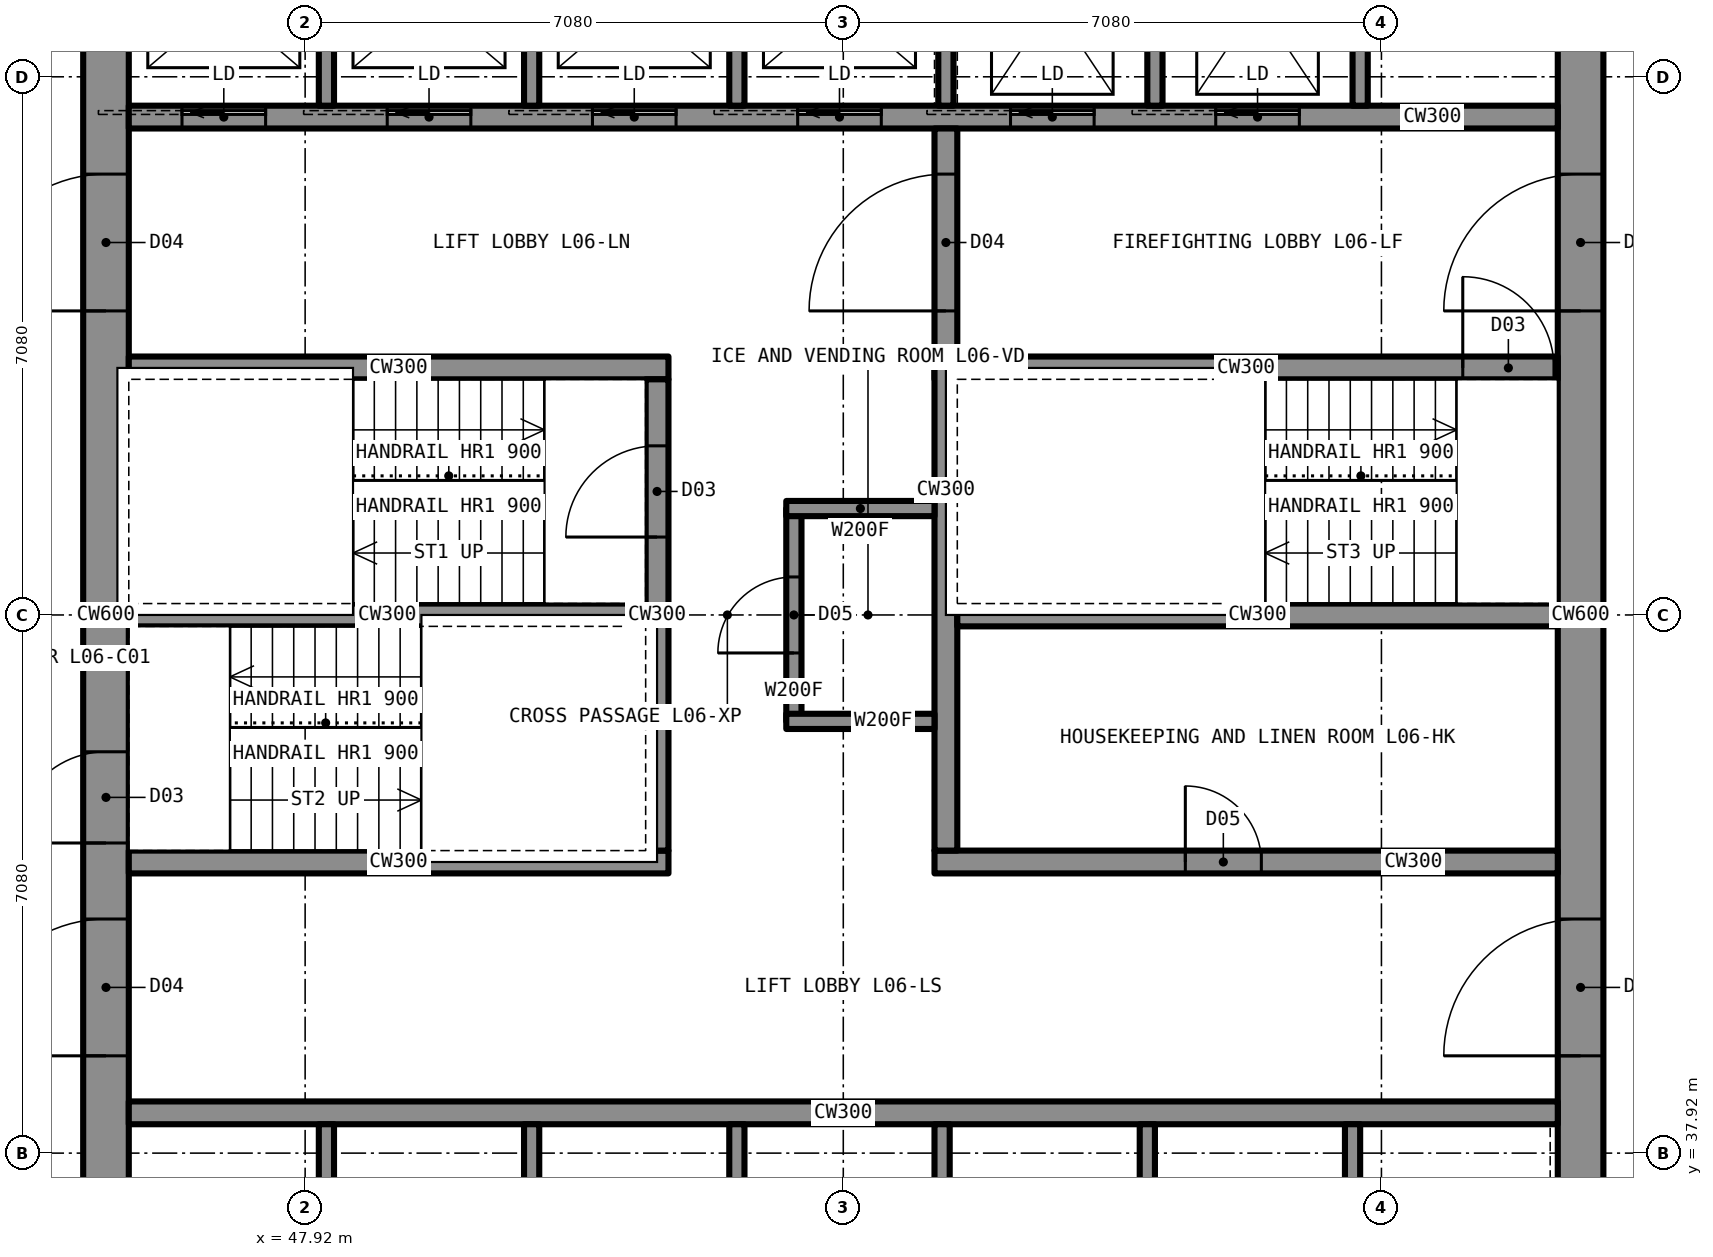
"""IFC4 building model, lengths in metres.
Left out: names, types, materials, properties, quantities, classifications, styles, units other than length and angle.
Written with IfcOpenShell. Run it as: python <this file> out.ifc"""

import sys

from ifc_helpers import new_model, si_unit, direction, frame, frame_2d, origin, place, context, subcontext, project, spatial, rectangle, extrude, element, fill, save


model = new_model("IFC4")
c1 = context("Model", 3, precision=1e-05, world=origin(), true_north=direction((0.0, 1.0)))
c2 = subcontext(c1, "Body", "Model", "MODEL_VIEW")
j1 = project(units=[si_unit("LENGTHUNIT", "METRE"), si_unit("PLANEANGLEUNIT", "RADIAN")], contexts=[c1])
p1 = place(None, origin())
s1 = spatial("IfcSite", under=j1, at=p1, CompositionType="ELEMENT")
p2 = place(p1, origin())
s2 = spatial("IfcBuilding", under=s1, at=p2, CompositionType="ELEMENT")
p3 = place(p2, frame((0.0, 0.0, 28.5)))
s3 = spatial("IfcBuildingStorey", under=s2, at=p3, CompositionType="ELEMENT", Elevation=28.5)
p4 = place(p3, frame((64.7, 35.6, 0.0), z_axis=(0.0, 0.0, 1.0), x_axis=(0.0, 1.0, 0.0)))
e1 = element("IfcWall", 1, at=p4, inside=s3, PredefinedType="SHEAR", context=c2, shape_type="SweptSolid", body=[
    extrude(rectangle(XDim=18.8, YDim=0.6, at=frame_2d((9.4, 0.0))), origin(), (0.0, 0.0, 1.0), 3.5),
])
p5 = place(p4, frame((13.4, 0.0, 0.0)))
e2 = element("IfcOpeningElement", 2, at=p5, cuts=e1, PredefinedType="OPENING", context=c2, shape_type="SweptSolid", body=[
    extrude(rectangle(XDim=1.8, YDim=2.2, at=frame_2d((0.9, 1.1))), frame((0.0, 0.31, 0.0), z_axis=(0.0, -1.0, 0.0), x_axis=(1.0, 0.0, 0.0)), (0.0, 0.0, 1.0), 0.62),
])
p6 = place(p4, frame((3.6, 0.0, 0.0)))
e3 = element("IfcOpeningElement", 3, at=p6, cuts=e1, PredefinedType="OPENING", context=c2, shape_type="SweptSolid", body=[
    extrude(rectangle(XDim=1.8, YDim=2.2, at=frame_2d((0.9, 1.1))), frame((0.0, 0.31, 0.0), z_axis=(0.0, -1.0, 0.0), x_axis=(1.0, 0.0, 0.0)), (0.0, 0.0, 1.0), 0.62),
])
p7 = place(p3, frame((45.3, 35.6, 0.0), z_axis=(0.0, 0.0, 1.0), x_axis=(0.0, 1.0, 0.0)))
e4 = element("IfcWall", 4, at=p7, inside=s3, PredefinedType="SHEAR", context=c2, shape_type="SweptSolid", body=[
    extrude(rectangle(XDim=18.8, YDim=0.6, at=frame_2d((9.4, 0.0))), origin(), (0.0, 0.0, 1.0), 3.5),
])
p8 = place(p7, frame((13.4, 0.0, 0.0)))
e5 = element("IfcOpeningElement", 5, at=p8, cuts=e4, PredefinedType="OPENING", context=c2, shape_type="SweptSolid", body=[
    extrude(rectangle(XDim=1.8, YDim=2.2, at=frame_2d((0.9, 1.1))), frame((0.0, 0.31, 0.0), z_axis=(0.0, -1.0, 0.0), x_axis=(1.0, 0.0, 0.0)), (0.0, 0.0, 1.0), 0.62),
])
p9 = place(p7, frame((3.6, 0.0, 0.0)))
e6 = element("IfcOpeningElement", 6, at=p9, cuts=e4, PredefinedType="OPENING", context=c2, shape_type="SweptSolid", body=[
    extrude(rectangle(XDim=1.8, YDim=2.2, at=frame_2d((0.9, 1.1))), frame((0.0, 0.31, 0.0), z_axis=(0.0, -1.0, 0.0), x_axis=(1.0, 0.0, 0.0)), (0.0, 0.0, 1.0), 0.62),
])
p10 = place(p7, frame((6.4, 0.0, 0.0)))
e7 = element("IfcOpeningElement", 7, at=p10, cuts=e4, PredefinedType="OPENING", context=c2, shape_type="SweptSolid", body=[
    extrude(rectangle(XDim=1.2, YDim=2.2, at=frame_2d((0.6, 1.1))), frame((0.0, 0.31, 0.0), z_axis=(0.0, -1.0, 0.0), x_axis=(1.0, 0.0, 0.0)), (0.0, 0.0, 1.0), 0.62),
])
p11 = place(p3, frame((45.6, 51.55, 0.0), z_axis=(0.0, 0.0, 1.0), x_axis=(1.0, 0.0, 0.0)))
e8 = element("IfcWall", 8, at=p11, inside=s3, PredefinedType="SHEAR", context=c2, shape_type="SweptSolid", body=[
    extrude(rectangle(XDim=18.8, YDim=0.3, at=frame_2d((9.4, 0.0))), origin(), (0.0, 0.0, 1.0), 3.5),
])
p12 = place(p11, frame((0.7, 0.0, 0.0)))
e9 = element("IfcOpeningElement", 9, at=p12, cuts=e8, PredefinedType="OPENING", context=c2, shape_type="SweptSolid", body=[
    extrude(rectangle(XDim=1.1, YDim=2.2, at=frame_2d((0.55, 1.1))), frame((0.0, 0.16, 0.0), z_axis=(0.0, -1.0, 0.0), x_axis=(1.0, 0.0, 0.0)), (0.0, 0.0, 1.0), 0.32),
])
p13 = place(p11, frame((3.4, 0.0, 0.0)))
e10 = element("IfcOpeningElement", 10, at=p13, cuts=e8, PredefinedType="OPENING", context=c2, shape_type="SweptSolid", body=[
    extrude(rectangle(XDim=1.1, YDim=2.2, at=frame_2d((0.55, 1.1))), frame((0.0, 0.16, 0.0), z_axis=(0.0, -1.0, 0.0), x_axis=(1.0, 0.0, 0.0)), (0.0, 0.0, 1.0), 0.32),
])
p14 = place(p11, frame((6.1, 0.0, 0.0)))
e11 = element("IfcOpeningElement", 11, at=p14, cuts=e8, PredefinedType="OPENING", context=c2, shape_type="SweptSolid", body=[
    extrude(rectangle(XDim=1.1, YDim=2.2, at=frame_2d((0.55, 1.1))), frame((0.0, 0.16, 0.0), z_axis=(0.0, -1.0, 0.0), x_axis=(1.0, 0.0, 0.0)), (0.0, 0.0, 1.0), 0.32),
])
p15 = place(p11, frame((8.8, 0.0, 0.0)))
e12 = element("IfcOpeningElement", 12, at=p15, cuts=e8, PredefinedType="OPENING", context=c2, shape_type="SweptSolid", body=[
    extrude(rectangle(XDim=1.1, YDim=2.2, at=frame_2d((0.55, 1.1))), frame((0.0, 0.16, 0.0), z_axis=(0.0, -1.0, 0.0), x_axis=(1.0, 0.0, 0.0)), (0.0, 0.0, 1.0), 0.32),
])
p16 = place(p11, frame((11.6, 0.0, 0.0)))
e13 = element("IfcOpeningElement", 13, at=p16, cuts=e8, PredefinedType="OPENING", context=c2, shape_type="SweptSolid", body=[
    extrude(rectangle(XDim=1.1, YDim=2.2, at=frame_2d((0.55, 1.1))), frame((0.0, 0.16, 0.0), z_axis=(0.0, -1.0, 0.0), x_axis=(1.0, 0.0, 0.0)), (0.0, 0.0, 1.0), 0.32),
])
p17 = place(p11, frame((14.3, 0.0, 0.0)))
e14 = element("IfcOpeningElement", 14, at=p17, cuts=e8, PredefinedType="OPENING", context=c2, shape_type="SweptSolid", body=[
    extrude(rectangle(XDim=1.1, YDim=2.2, at=frame_2d((0.55, 1.1))), frame((0.0, 0.16, 0.0), z_axis=(0.0, -1.0, 0.0), x_axis=(1.0, 0.0, 0.0)), (0.0, 0.0, 1.0), 0.32),
])
p18 = place(p3, frame((45.6, 38.45, 0.0), z_axis=(0.0, 0.0, 1.0), x_axis=(1.0, 0.0, 0.0)))
e15 = element("IfcWall", 15, at=p18, inside=s3, PredefinedType="SHEAR", context=c2, shape_type="SweptSolid", body=[
    extrude(rectangle(XDim=18.8, YDim=0.3, at=frame_2d((9.4, 0.0))), origin(), (0.0, 0.0, 1.0), 3.5),
])
p19 = place(p3, frame((45.6, 48.25, 0.0), z_axis=(0.0, 0.0, 1.0), x_axis=(1.0, 0.0, 0.0)))
e16 = element("IfcWall", 16, at=p19, inside=s3, PredefinedType="SHEAR", context=c2, shape_type="SweptSolid", body=[
    extrude(rectangle(XDim=7.1, YDim=0.3, at=frame_2d((3.55, 0.0))), origin(), (0.0, 0.0, 1.0), 3.5),
])
p20 = place(p3, frame((56.2, 48.25, 0.0), z_axis=(0.0, 0.0, 1.0), x_axis=(1.0, 0.0, 0.0)))
e17 = element("IfcWall", 17, at=p20, inside=s3, PredefinedType="SHEAR", context=c2, shape_type="SweptSolid", body=[
    extrude(rectangle(XDim=8.2, YDim=0.3, at=frame_2d((4.1, 0.0))), origin(), (0.0, 0.0, 1.0), 3.5),
])
p21 = place(p20, frame((6.95, 0.0, 0.0)))
e18 = element("IfcOpeningElement", 18, at=p21, cuts=e17, PredefinedType="OPENING", context=c2, shape_type="SweptSolid", body=[
    extrude(rectangle(XDim=1.2, YDim=2.2, at=frame_2d((0.6, 1.1))), frame((0.0, 0.16, 0.0), z_axis=(0.0, -1.0, 0.0), x_axis=(1.0, 0.0, 0.0)), (0.0, 0.0, 1.0), 0.32),
])
p22 = place(p3, frame((45.6, 41.75, 0.0), z_axis=(0.0, 0.0, 1.0), x_axis=(1.0, 0.0, 0.0)))
e19 = element("IfcWall", 19, at=p22, inside=s3, PredefinedType="SHEAR", context=c2, shape_type="SweptSolid", body=[
    extrude(rectangle(XDim=7.1, YDim=0.3, at=frame_2d((3.55, 0.0))), origin(), (0.0, 0.0, 1.0), 3.5),
])
p23 = place(p3, frame((56.2, 41.75, 0.0), z_axis=(0.0, 0.0, 1.0), x_axis=(1.0, 0.0, 0.0)))
e20 = element("IfcWall", 20, at=p23, inside=s3, PredefinedType="SHEAR", context=c2, shape_type="SweptSolid", body=[
    extrude(rectangle(XDim=8.2, YDim=0.3, at=frame_2d((4.1, 0.0))), origin(), (0.0, 0.0, 1.0), 3.5),
])
p24 = place(p23, frame((3.3, 0.0, 0.0)))
e21 = element("IfcOpeningElement", 21, at=p24, cuts=e20, PredefinedType="OPENING", context=c2, shape_type="SweptSolid", body=[
    extrude(rectangle(XDim=1.0, YDim=2.1, at=frame_2d((0.5, 1.05))), frame((0.0, 0.16, 0.0), z_axis=(0.0, -1.0, 0.0), x_axis=(1.0, 0.0, 0.0)), (0.0, 0.0, 1.0), 0.32),
])
p25 = place(p3, frame((52.55, 41.9, 0.0), z_axis=(0.0, 0.0, 1.0), x_axis=(0.0, 1.0, 0.0)))
e22 = element("IfcWall", 22, at=p25, inside=s3, PredefinedType="SHEAR", context=c2, shape_type="SweptSolid", body=[
    extrude(rectangle(XDim=6.2, YDim=0.3, at=frame_2d((3.1, 0.0))), origin(), (0.0, 0.0, 1.0), 3.5),
])
p26 = place(p25, frame((4.125, 0.0, 0.0)))
e23 = element("IfcOpeningElement", 23, at=p26, cuts=e22, PredefinedType="OPENING", context=c2, shape_type="SweptSolid", body=[
    extrude(rectangle(XDim=1.2, YDim=2.2, at=frame_2d((0.6, 1.1))), frame((0.0, 0.16, 0.0), z_axis=(0.0, -1.0, 0.0), x_axis=(1.0, 0.0, 0.0)), (0.0, 0.0, 1.0), 0.32),
])
p27 = place(p3, frame((56.35, 41.9, 0.0), z_axis=(0.0, 0.0, 1.0), x_axis=(0.0, 1.0, 0.0)))
e24 = element("IfcWall", 24, at=p27, inside=s3, PredefinedType="SHEAR", context=c2, shape_type="SweptSolid", body=[
    extrude(rectangle(XDim=9.5, YDim=0.3, at=frame_2d((4.75, 0.0))), origin(), (0.0, 0.0, 1.0), 3.5),
])
p28 = place(p27, frame((7.1, 0.0, 0.0)))
e25 = element("IfcOpeningElement", 25, at=p28, cuts=e24, PredefinedType="OPENING", context=c2, shape_type="SweptSolid", body=[
    extrude(rectangle(XDim=1.8, YDim=2.2, at=frame_2d((0.9, 1.1))), frame((0.0, 0.16, 0.0), z_axis=(0.0, -1.0, 0.0), x_axis=(1.0, 0.0, 0.0)), (0.0, 0.0, 1.0), 0.32),
])
p29 = place(p3, frame((45.6, 45.0, 0.0), z_axis=(0.0, 0.0, 1.0), x_axis=(1.0, 0.0, 0.0)))
e26 = element("IfcWall", 26, at=p29, inside=s3, PredefinedType="SHEAR", context=c2, shape_type="SweptSolid", body=[
    extrude(rectangle(XDim=6.8, YDim=0.3, at=frame_2d((3.4, 0.0))), origin(), (0.0, 0.0, 1.0), 3.5),
])
p30 = place(p3, frame((56.5, 45.0, 0.0), z_axis=(0.0, 0.0, 1.0), x_axis=(1.0, 0.0, 0.0)))
e27 = element("IfcWall", 27, at=p30, inside=s3, PredefinedType="SHEAR", context=c2, shape_type="SweptSolid", body=[
    extrude(rectangle(XDim=7.9, YDim=0.3, at=frame_2d((3.95, 0.0))), origin(), (0.0, 0.0, 1.0), 3.5),
])
p31 = place(p3, frame((54.35, 43.6, 0.0), z_axis=(0.0, 0.0, 1.0), x_axis=(0.0, 1.0, 0.0)))
e28 = element("IfcWall", 28, at=p31, inside=s3, PredefinedType="PARTITIONING", context=c2, shape_type="SweptSolid", body=[
    extrude(rectangle(XDim=2.8, YDim=0.2, at=frame_2d((1.4, 0.0))), origin(), (0.0, 0.0, 1.0), 3.33),
])
p32 = place(p31, frame((0.9, 0.0, 0.0)))
e29 = element("IfcOpeningElement", 29, at=p32, cuts=e28, PredefinedType="OPENING", context=c2, shape_type="SweptSolid", body=[
    extrude(rectangle(XDim=1.0, YDim=2.1, at=frame_2d((0.5, 1.05))), frame((0.0, 0.11, 0.0), z_axis=(0.0, -1.0, 0.0), x_axis=(1.0, 0.0, 0.0)), (0.0, 0.0, 1.0), 0.22),
])
for number, where, z_axis, x_axis in (
    (30, (54.25, 43.6, 0.0), (0.0, 0.0, 1.0), (1.0, 0.0, 0.0)),
    (31, (54.25, 46.4, 0.0), (0.0, 0.0, 1.0), (1.0, 0.0, 0.0)),
):
    element("IfcWall", number, at=place(p3, frame(where, z_axis=z_axis, x_axis=x_axis)), inside=s3, PredefinedType="PARTITIONING", context=c2, shape_type="SweptSolid", body=[
        extrude(rectangle(XDim=1.95, YDim=0.2, at=frame_2d((0.975, 0.0))), origin(), (0.0, 0.0, 1.0), 3.33),
    ])
for number, where, z_axis, x_axis in (
    (32, (48.2, 51.7, 0.0), (0.0, 0.0, 1.0), (0.0, 1.0, 0.0)),
    (33, (50.9, 51.7, 0.0), (0.0, 0.0, 1.0), (0.0, 1.0, 0.0)),
    (34, (53.6, 51.7, 0.0), (0.0, 0.0, 1.0), (0.0, 1.0, 0.0)),
    (35, (59.1, 51.7, 0.0), (0.0, 0.0, 1.0), (0.0, 1.0, 0.0)),
    (36, (61.8, 51.7, 0.0), (0.0, 0.0, 1.0), (0.0, 1.0, 0.0)),
    (37, (56.35, 51.7, 0.0), (0.0, 0.0, 1.0), (0.0, 1.0, 0.0)),
    (38, (48.2, 35.6, 0.0), (0.0, 0.0, 1.0), (0.0, 1.0, 0.0)),
    (39, (50.9, 35.6, 0.0), (0.0, 0.0, 1.0), (0.0, 1.0, 0.0)),
    (40, (53.6, 35.6, 0.0), (0.0, 0.0, 1.0), (0.0, 1.0, 0.0)),
    (41, (56.3, 35.6, 0.0), (0.0, 0.0, 1.0), (0.0, 1.0, 0.0)),
    (42, (59.0, 35.6, 0.0), (0.0, 0.0, 1.0), (0.0, 1.0, 0.0)),
    (43, (61.7, 35.6, 0.0), (0.0, 0.0, 1.0), (0.0, 1.0, 0.0)),
):
    element("IfcWall", number, at=place(p3, frame(where, z_axis=z_axis, x_axis=x_axis)), inside=s3, PredefinedType="PARTITIONING", context=c2, shape_type="SweptSolid", body=[
        extrude(rectangle(XDim=2.7, YDim=0.2, at=frame_2d((1.35, 0.0))), origin(), (0.0, 0.0, 1.0), 3.33),
    ])
p33 = place(p32, origin())
e44 = element("IfcDoor", 44, at=p33, inside=s3, OperationType="SINGLE_SWING_LEFT", PredefinedType="DOOR", context=c2, shape_type="SweptSolid", body=[
    extrude(rectangle(XDim=1.0, YDim=2.1, at=frame_2d((0.5, 1.05))), frame((0.0, 0.025, 0.0), z_axis=(0.0, -1.0, 0.0), x_axis=(1.0, 0.0, 0.0)), (0.0, 0.0, 1.0), 0.05),
])
fill(e29, e44)
p34 = place(p8, origin())
e45 = element("IfcDoor", 45, at=p34, inside=s3, OperationType="DOUBLE_DOOR_SINGLE_SWING", PredefinedType="DOOR", context=c2, shape_type="SweptSolid", body=[
    extrude(rectangle(XDim=1.8, YDim=2.2, at=frame_2d((0.9, 1.1))), frame((0.0, 0.025, 0.0), z_axis=(0.0, -1.0, 0.0), x_axis=(1.0, 0.0, 0.0)), (0.0, 0.0, 1.0), 0.05),
])
fill(e5, e45)
p35 = place(p9, origin())
e46 = element("IfcDoor", 46, at=p35, inside=s3, OperationType="DOUBLE_DOOR_SINGLE_SWING", PredefinedType="DOOR", context=c2, shape_type="SweptSolid", body=[
    extrude(rectangle(XDim=1.8, YDim=2.2, at=frame_2d((0.9, 1.1))), frame((0.0, 0.025, 0.0), z_axis=(0.0, -1.0, 0.0), x_axis=(1.0, 0.0, 0.0)), (0.0, 0.0, 1.0), 0.05),
])
fill(e6, e46)
p36 = place(p5, origin())
e47 = element("IfcDoor", 47, at=p36, inside=s3, OperationType="DOUBLE_DOOR_SINGLE_SWING", PredefinedType="DOOR", context=c2, shape_type="SweptSolid", body=[
    extrude(rectangle(XDim=1.8, YDim=2.2, at=frame_2d((0.9, 1.1))), frame((0.0, 0.025, 0.0), z_axis=(0.0, -1.0, 0.0), x_axis=(1.0, 0.0, 0.0)), (0.0, 0.0, 1.0), 0.05),
])
fill(e2, e47)
p37 = place(p6, origin())
e48 = element("IfcDoor", 48, at=p37, inside=s3, OperationType="DOUBLE_DOOR_SINGLE_SWING", PredefinedType="DOOR", context=c2, shape_type="SweptSolid", body=[
    extrude(rectangle(XDim=1.8, YDim=2.2, at=frame_2d((0.9, 1.1))), frame((0.0, 0.025, 0.0), z_axis=(0.0, -1.0, 0.0), x_axis=(1.0, 0.0, 0.0)), (0.0, 0.0, 1.0), 0.05),
])
fill(e3, e48)
p38 = place(p28, origin())
e49 = element("IfcDoor", 49, at=p38, inside=s3, OperationType="DOUBLE_DOOR_SINGLE_SWING", PredefinedType="DOOR", context=c2, shape_type="SweptSolid", body=[
    extrude(rectangle(XDim=1.8, YDim=2.2, at=frame_2d((0.9, 1.1))), frame((0.0, 0.025, 0.0), z_axis=(0.0, -1.0, 0.0), x_axis=(1.0, 0.0, 0.0)), (0.0, 0.0, 1.0), 0.05),
])
fill(e25, e49)
p39 = place(p26, origin())
e50 = element("IfcDoor", 50, at=p39, inside=s3, OperationType="SINGLE_SWING_LEFT", PredefinedType="DOOR", context=c2, shape_type="SweptSolid", body=[
    extrude(rectangle(XDim=1.2, YDim=2.2, at=frame_2d((0.6, 1.1))), frame((0.0, 0.025, 0.0), z_axis=(0.0, -1.0, 0.0), x_axis=(1.0, 0.0, 0.0)), (0.0, 0.0, 1.0), 0.05),
])
fill(e23, e50)
p40 = place(p10, origin())
e51 = element("IfcDoor", 51, at=p40, inside=s3, OperationType="SINGLE_SWING_LEFT", PredefinedType="DOOR", context=c2, shape_type="SweptSolid", body=[
    extrude(rectangle(XDim=1.2, YDim=2.2, at=frame_2d((0.6, 1.1))), frame((0.0, 0.025, 0.0), z_axis=(0.0, -1.0, 0.0), x_axis=(1.0, 0.0, 0.0)), (0.0, 0.0, 1.0), 0.05),
])
fill(e7, e51)
p41 = place(p21, origin())
e52 = element("IfcDoor", 52, at=p41, inside=s3, OperationType="SINGLE_SWING_LEFT", PredefinedType="DOOR", context=c2, shape_type="SweptSolid", body=[
    extrude(rectangle(XDim=1.2, YDim=2.2, at=frame_2d((0.6, 1.1))), frame((0.0, 0.025, 0.0), z_axis=(0.0, -1.0, 0.0), x_axis=(1.0, 0.0, 0.0)), (0.0, 0.0, 1.0), 0.05),
])
fill(e18, e52)
p42 = place(p24, origin())
e53 = element("IfcDoor", 53, at=p42, inside=s3, OperationType="SINGLE_SWING_LEFT", PredefinedType="DOOR", context=c2, shape_type="SweptSolid", body=[
    extrude(rectangle(XDim=1.0, YDim=2.1, at=frame_2d((0.5, 1.05))), frame((0.0, 0.025, 0.0), z_axis=(0.0, -1.0, 0.0), x_axis=(1.0, 0.0, 0.0)), (0.0, 0.0, 1.0), 0.05),
])
fill(e21, e53)
p43 = place(p12, origin())
e54 = element("IfcDoor", 54, at=p43, inside=s3, OperationType="SLIDING_TO_LEFT", PredefinedType="DOOR", context=c2, shape_type="SweptSolid", body=[
    extrude(rectangle(XDim=1.1, YDim=2.2, at=frame_2d((0.55, 1.1))), frame((0.0, 0.025, 0.0), z_axis=(0.0, -1.0, 0.0), x_axis=(1.0, 0.0, 0.0)), (0.0, 0.0, 1.0), 0.05),
])
fill(e9, e54)
p44 = place(p13, origin())
e55 = element("IfcDoor", 55, at=p44, inside=s3, OperationType="SLIDING_TO_LEFT", PredefinedType="DOOR", context=c2, shape_type="SweptSolid", body=[
    extrude(rectangle(XDim=1.1, YDim=2.2, at=frame_2d((0.55, 1.1))), frame((0.0, 0.025, 0.0), z_axis=(0.0, -1.0, 0.0), x_axis=(1.0, 0.0, 0.0)), (0.0, 0.0, 1.0), 0.05),
])
fill(e10, e55)
p45 = place(p14, origin())
e56 = element("IfcDoor", 56, at=p45, inside=s3, OperationType="SLIDING_TO_LEFT", PredefinedType="DOOR", context=c2, shape_type="SweptSolid", body=[
    extrude(rectangle(XDim=1.1, YDim=2.2, at=frame_2d((0.55, 1.1))), frame((0.0, 0.025, 0.0), z_axis=(0.0, -1.0, 0.0), x_axis=(1.0, 0.0, 0.0)), (0.0, 0.0, 1.0), 0.05),
])
fill(e11, e56)
p46 = place(p15, origin())
e57 = element("IfcDoor", 57, at=p46, inside=s3, OperationType="SLIDING_TO_LEFT", PredefinedType="DOOR", context=c2, shape_type="SweptSolid", body=[
    extrude(rectangle(XDim=1.1, YDim=2.2, at=frame_2d((0.55, 1.1))), frame((0.0, 0.025, 0.0), z_axis=(0.0, -1.0, 0.0), x_axis=(1.0, 0.0, 0.0)), (0.0, 0.0, 1.0), 0.05),
])
fill(e12, e57)
p47 = place(p16, origin())
e58 = element("IfcDoor", 58, at=p47, inside=s3, OperationType="SLIDING_TO_LEFT", PredefinedType="DOOR", context=c2, shape_type="SweptSolid", body=[
    extrude(rectangle(XDim=1.1, YDim=2.2, at=frame_2d((0.55, 1.1))), frame((0.0, 0.025, 0.0), z_axis=(0.0, -1.0, 0.0), x_axis=(1.0, 0.0, 0.0)), (0.0, 0.0, 1.0), 0.05),
])
fill(e13, e58)
p48 = place(p17, origin())
e59 = element("IfcDoor", 59, at=p48, inside=s3, OperationType="SLIDING_TO_LEFT", PredefinedType="DOOR", context=c2, shape_type="SweptSolid", body=[
    extrude(rectangle(XDim=1.1, YDim=2.2, at=frame_2d((0.55, 1.1))), frame((0.0, 0.025, 0.0), z_axis=(0.0, -1.0, 0.0), x_axis=(1.0, 0.0, 0.0)), (0.0, 0.0, 1.0), 0.05),
])
fill(e14, e59)
save(model, sys.argv[1])
